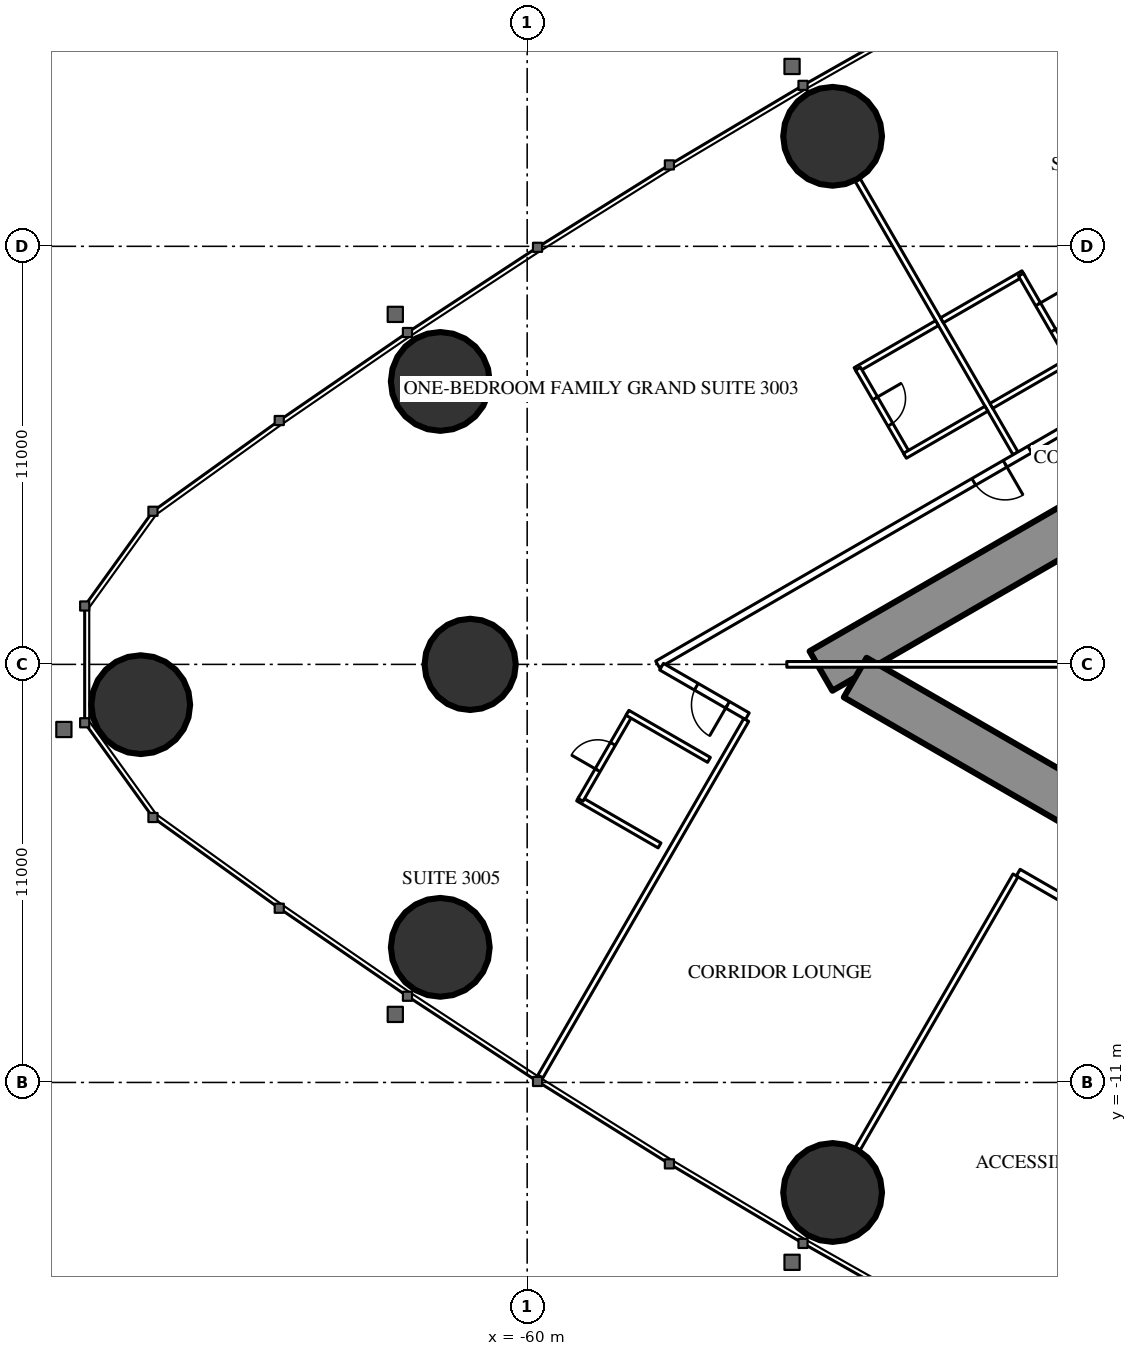
"""IFC4 building model, lengths in metres.
Left out: names, types, materials, properties, quantities, classifications, styles, units other than length and angle.
Written with IfcOpenShell. Run it as: python <this file> out.ifc"""

import sys

from ifc_helpers import new_model, si_unit, direction, frame, frame_2d, origin, origin_2d, place, context, subcontext, project, spatial, rectangle, circle, hollow_circle, extrude, element, fill, save


model = new_model("IFC4")
c1 = context("Model", 3, precision=1e-05, world=origin(), true_north=direction((0.0, 1.0)))
c2 = subcontext(c1, "Body", "Model", "MODEL_VIEW")
j1 = project(units=[si_unit("LENGTHUNIT", "METRE"), si_unit("PLANEANGLEUNIT", "RADIAN")], contexts=[c1])
p1 = place(None, origin())
s1 = spatial("IfcSite", under=j1, at=p1, CompositionType="ELEMENT")
p2 = place(p1, origin())
s2 = spatial("IfcBuilding", under=s1, at=p2, CompositionType="ELEMENT")
p3 = place(p2, frame((0.0, 0.0, 115.1)))
s3 = spatial("IfcBuildingStorey", under=s2, at=p3, CompositionType="ELEMENT", Elevation=115.1)
for number, where, z_axis, x_axis in (
    (1, (-70.168, -1.06, 0.0), (0.0, 0.0, 1.0), (1.0, 0.0, 0.0)),
    (2, (-62.287, -7.445, 0.0), (0.0, 0.0, 1.0), (1.0, 0.0, 0.0)),
    (3, (-51.963, -13.895, 0.0), (0.0, 0.0, 1.0), (1.0, 0.0, 0.0)),
    (4, (-51.963, 13.895, 0.0), (0.0, 0.0, 1.0), (1.0, 0.0, 0.0)),
    (5, (-62.287, 7.445, 0.0), (0.0, 0.0, 1.0), (1.0, 0.0, 0.0)),
):
    element("IfcColumn", number, at=place(p3, frame(where, z_axis=z_axis, x_axis=x_axis)), inside=s3, PredefinedType="COLUMN", context=c2, shape_type="SweptSolid", body=[
        extrude(hollow_circle(Radius=1.3, WallThickness=0.1, at=origin_2d()), origin(), (0.0, 0.0, 1.0), 3.5),
    ])
p4 = place(p3, frame((-61.5, 0.0, 0.0), z_axis=(0.0, 0.0, 1.0), x_axis=(1.0, 0.0, 0.0)))
e6 = element("IfcColumn", 6, at=p4, inside=s3, PredefinedType="COLUMN", context=c2, shape_type="SweptSolid", body=[
    extrude(circle(Radius=1.2, at=origin_2d()), origin(), (0.0, 0.0, 1.0), 3.5),
])
p5 = place(p3, frame((-27.2, 14.3, 0.0), z_axis=(0.0, 0.0, 1.0), x_axis=(-0.866026593062, -0.499997940104, 0.0)))
e7 = element("IfcWall", 7, at=p5, inside=s3, PredefinedType="SHEAR", context=c2, shape_type="SweptSolid", body=[
    extrude(rectangle(XDim=28.946, YDim=1.2, at=frame_2d((14.473, 0.0))), origin(), (0.0, 0.0, 1.0), 3.5),
])
p6 = place(p5, frame((4.6, 0.0, 0.0)))
e8 = element("IfcOpeningElement", 8, at=p6, cuts=e7, PredefinedType="OPENING", context=c2, shape_type="SweptSolid", body=[
    extrude(rectangle(XDim=1.0, YDim=2.2, at=frame_2d((0.5, 1.1))), frame((0.0, 0.61, 0.0), z_axis=(0.0, -1.0, 0.0), x_axis=(1.0, 0.0, 0.0)), (0.0, 0.0, 1.0), 1.22),
])
p7 = place(p5, frame((13.395, 0.0, 0.0)))
e9 = element("IfcOpeningElement", 9, at=p7, cuts=e7, PredefinedType="OPENING", context=c2, shape_type="SweptSolid", body=[
    extrude(rectangle(XDim=1.8, YDim=2.2, at=frame_2d((0.9, 1.1))), frame((0.0, 0.61, 0.0), z_axis=(0.0, -1.0, 0.0), x_axis=(1.0, 0.0, 0.0)), (0.0, 0.0, 1.0), 1.22),
])
p8 = place(p3, frame((-27.2, -14.3, 0.0), z_axis=(0.0, 0.0, 1.0), x_axis=(-0.866024021859, 0.500002393557, 0.0)))
e10 = element("IfcWall", 10, at=p8, inside=s3, PredefinedType="SHEAR", context=c2, shape_type="SweptSolid", body=[
    extrude(rectangle(XDim=27.907, YDim=1.2, at=frame_2d((13.954, 0.0))), origin(), (0.0, 0.0, 1.0), 3.5),
])
p9 = place(p8, frame((4.6, 0.0, 0.0)))
e11 = element("IfcOpeningElement", 11, at=p9, cuts=e10, PredefinedType="OPENING", context=c2, shape_type="SweptSolid", body=[
    extrude(rectangle(XDim=1.0, YDim=2.2, at=frame_2d((0.5, 1.1))), frame((0.0, 0.61, 0.0), z_axis=(0.0, -1.0, 0.0), x_axis=(1.0, 0.0, 0.0)), (0.0, 0.0, 1.0), 1.22),
])
p10 = place(p8, frame((13.395, 0.0, 0.0)))
e12 = element("IfcOpeningElement", 12, at=p10, cuts=e10, PredefinedType="OPENING", context=c2, shape_type="SweptSolid", body=[
    extrude(rectangle(XDim=1.8, YDim=2.2, at=frame_2d((0.9, 1.1))), frame((0.0, 0.61, 0.0), z_axis=(0.0, -1.0, 0.0), x_axis=(1.0, 0.0, 0.0)), (0.0, 0.0, 1.0), 1.22),
])
for number, where, z_axis, x_axis in (
    (13, (-47.151, 5.552, 0.0), (0.0, 0.0, 1.0), (-0.5, 0.866, 0.0)),
    (14, (-47.151, -5.552, 0.0), (0.0, 0.0, 1.0), (-0.5, -0.866, 0.0)),
):
    element("IfcWall", number, at=place(p3, frame(where, z_axis=z_axis, x_axis=x_axis)), inside=s3, PredefinedType="PARTITIONING", context=c2, shape_type="SweptSolid", body=[
        extrude(rectangle(XDim=8.311, YDim=0.15, at=frame_2d((4.156, 0.0))), origin(), (0.0, 0.0, 1.0), 2.2),
    ])
p11 = place(p3, frame((-54.236, -1.462, 0.0), z_axis=(0.0, 0.0, 1.0), x_axis=(-0.499990351854, -0.866030974073, 0.0)))
e15 = element("IfcWall", 15, at=p11, inside=s3, PredefinedType="PARTITIONING", context=c2, shape_type="SweptSolid", body=[
    extrude(rectangle(XDim=10.834, YDim=0.15, at=frame_2d((5.417, 0.0))), origin(), (0.0, 0.0, 1.0), 3.25),
])
p12 = place(p3, frame((-37.7, 10.894, 0.0), z_axis=(0.0, 0.0, 1.0), x_axis=(-0.866027905338, -0.499995667157, 0.0)))
e16 = element("IfcWall", 16, at=p12, inside=s3, PredefinedType="PARTITIONING", context=c2, shape_type="SweptSolid", body=[
    extrude(rectangle(XDim=21.787, YDim=0.2, at=frame_2d((10.894, 0.0))), origin(), (0.0, 0.0, 1.0), 3.25),
])
p13 = place(p12, frame((11.23, 0.0, 0.0)))
e17 = element("IfcOpeningElement", 17, at=p13, cuts=e16, PredefinedType="OPENING", context=c2, shape_type="SweptSolid", body=[
    extrude(rectangle(XDim=0.95, YDim=2.2, at=frame_2d((0.475, 1.1))), frame((0.0, 0.11, 0.0), z_axis=(0.0, -1.0, 0.0), x_axis=(1.0, 0.0, 0.0)), (0.0, 0.0, 1.0), 0.22),
])
p14 = place(p12, frame((9.531, 0.0, 0.0)))
e18 = element("IfcOpeningElement", 18, at=p14, cuts=e16, PredefinedType="OPENING", context=c2, shape_type="SweptSolid", body=[
    extrude(rectangle(XDim=0.95, YDim=2.2, at=frame_2d((0.475, 1.1))), frame((0.0, 0.11, 0.0), z_axis=(0.0, -1.0, 0.0), x_axis=(1.0, 0.0, 0.0)), (0.0, 0.0, 1.0), 0.22),
])
p15 = place(p3, frame((-36.92, -11.344, 0.0), z_axis=(0.0, 0.0, 1.0), x_axis=(-0.866027897759, 0.499995680284, 0.0)))
e19 = element("IfcWall", 19, at=p15, inside=s3, PredefinedType="PARTITIONING", context=c2, shape_type="SweptSolid", body=[
    extrude(rectangle(XDim=11.731, YDim=0.2, at=frame_2d((5.865, 0.0))), origin(), (0.0, 0.0, 1.0), 3.25),
])
p16 = place(p15, frame((3.35, 0.0, 0.0)))
e20 = element("IfcOpeningElement", 20, at=p16, cuts=e19, PredefinedType="OPENING", context=c2, shape_type="SweptSolid", body=[
    extrude(rectangle(XDim=1.0, YDim=2.2, at=frame_2d((0.5, 1.1))), frame((0.0, 0.11, 0.0), z_axis=(0.0, -1.0, 0.0), x_axis=(1.0, 0.0, 0.0)), (0.0, 0.0, 1.0), 0.22),
])
p17 = place(p3, frame((-54.207, -1.363, 0.0), z_axis=(0.0, 0.0, 1.0), x_axis=(-0.866049872286, 0.499957616916, 0.0)))
e21 = element("IfcWall", 21, at=p17, inside=s3, PredefinedType="PARTITIONING", context=c2, shape_type="SweptSolid", body=[
    extrude(rectangle(XDim=2.606, YDim=0.2, at=frame_2d((1.303, 0.0))), origin(), (0.0, 0.0, 1.0), 3.25),
])
p18 = place(p17, frame((0.6, 0.0, 0.0)))
e22 = element("IfcOpeningElement", 22, at=p18, cuts=e21, PredefinedType="OPENING", context=c2, shape_type="SweptSolid", body=[
    extrude(rectangle(XDim=0.95, YDim=2.2, at=frame_2d((0.475, 1.1))), frame((0.0, 0.11, 0.0), z_axis=(0.0, -1.0, 0.0), x_axis=(1.0, 0.0, 0.0)), (0.0, 0.0, 1.0), 0.22),
])
p19 = place(p3, frame((-49.216, 8.979, 0.0), z_axis=(0.0, 0.0, 1.0), x_axis=(-0.866031185235, -0.4999899861, 0.0)))
e23 = element("IfcWall", 23, at=p19, inside=s3, PredefinedType="PARTITIONING", context=c2, shape_type="SweptSolid", body=[
    extrude(rectangle(XDim=2.475, YDim=0.15, at=frame_2d((1.238, 0.0))), origin(), (0.0, 0.0, 1.0), 3.25),
])
p20 = place(p3, frame((-49.995, 5.527, 0.0), z_axis=(0.0, 0.0, 1.0), x_axis=(-0.500006934395, 0.866021400173, 0.0)))
e24 = element("IfcWall", 24, at=p20, inside=s3, PredefinedType="PARTITIONING", context=c2, shape_type="SweptSolid", body=[
    extrude(rectangle(XDim=2.6, YDim=0.15, at=frame_2d((1.3, 0.0))), origin(), (0.0, 0.0, 1.0), 3.25),
])
p21 = place(p20, frame((0.9, 0.0, 0.0)))
e25 = element("IfcOpeningElement", 25, at=p21, cuts=e24, PredefinedType="OPENING", context=c2, shape_type="SweptSolid", body=[
    extrude(rectangle(XDim=0.8, YDim=2.2, at=frame_2d((0.4, 1.1))), frame((0.0, 0.085, 0.0), z_axis=(0.0, -1.0, 0.0), x_axis=(1.0, 0.0, 0.0)), (0.0, 0.0, 1.0), 0.17),
])
for number, where, z_axis, x_axis in (
    (26, (-47.916, 6.727, 0.0), (0.0, 0.0, 1.0), (-0.866, -0.5, 0.0)),
    (27, (-56.517, -4.764, 0.0), (0.0, 0.0, 1.0), (-0.866, 0.5, 0.0)),
):
    element("IfcWall", number, at=place(p3, frame(where, z_axis=z_axis, x_axis=x_axis)), inside=s3, PredefinedType="PARTITIONING", context=c2, shape_type="SweptSolid", body=[
        extrude(rectangle(XDim=2.475, YDim=0.15, at=frame_2d((1.238, 0.0))), origin(), (0.0, 0.0, 1.0), 3.25),
    ])
p22 = place(p3, frame((-57.296, -1.312, 0.0), z_axis=(0.0, 0.0, 1.0), x_axis=(-0.49997716683, -0.86603858612, 0.0)))
e28 = element("IfcWall", 28, at=p22, inside=s3, PredefinedType="PARTITIONING", context=c2, shape_type="SweptSolid", body=[
    extrude(rectangle(XDim=2.6, YDim=0.15, at=frame_2d((1.3, 0.0))), origin(), (0.0, 0.0, 1.0), 3.25),
])
p23 = place(p22, frame((0.9, 0.0, 0.0)))
e29 = element("IfcOpeningElement", 29, at=p23, cuts=e28, PredefinedType="OPENING", context=c2, shape_type="SweptSolid", body=[
    extrude(rectangle(XDim=0.8, YDim=2.2, at=frame_2d((0.4, 1.1))), frame((0.0, 0.085, 0.0), z_axis=(0.0, -1.0, 0.0), x_axis=(1.0, 0.0, 0.0)), (0.0, 0.0, 1.0), 0.17),
])
p24 = place(p3, frame((-55.217, -2.512, 0.0), z_axis=(0.0, 0.0, 1.0), x_axis=(-0.866031185235, 0.4999899861, 0.0)))
e30 = element("IfcWall", 30, at=p24, inside=s3, PredefinedType="PARTITIONING", context=c2, shape_type="SweptSolid", body=[
    extrude(rectangle(XDim=2.475, YDim=0.15, at=frame_2d((1.238, 0.0))), origin(), (0.0, 0.0, 1.0), 3.25),
])
p25 = place(p3, frame((-46.943, 10.292, 0.0), z_axis=(0.0, 0.0, 1.0), x_axis=(-0.866006523861, -0.500032699561, 0.0)))
e31 = element("IfcWall", 31, at=p25, inside=s3, PredefinedType="PARTITIONING", context=c2, shape_type="SweptSolid", body=[
    extrude(rectangle(XDim=2.475, YDim=0.15, at=frame_2d((1.237, 0.0))), origin(), (0.0, 0.0, 1.0), 3.25),
])
p26 = place(p3, frame((-45.708, 8.002, 0.0), z_axis=(0.0, 0.0, 1.0), x_axis=(-0.500047596559, 0.865997922154, 0.0)))
e32 = element("IfcWall", 32, at=p26, inside=s3, PredefinedType="PARTITIONING", context=c2, shape_type="SweptSolid", body=[
    extrude(rectangle(XDim=2.6, YDim=0.15, at=frame_2d((1.3, 0.0))), origin(), (0.0, 0.0, 1.0), 3.25),
])
p27 = place(p26, frame((0.9, 0.0, 0.0)))
e33 = element("IfcOpeningElement", 33, at=p27, cuts=e32, PredefinedType="OPENING", context=c2, shape_type="SweptSolid", body=[
    extrude(rectangle(XDim=0.8, YDim=2.2, at=frame_2d((0.4, 1.1))), frame((0.0, 0.085, 0.0), z_axis=(0.0, -1.0, 0.0), x_axis=(1.0, 0.0, 0.0)), (0.0, 0.0, 1.0), 0.17),
])
p28 = place(p3, frame((-45.643, 8.04, 0.0), z_axis=(0.0, 0.0, 1.0), x_axis=(-0.866006523861, -0.500032699561, 0.0)))
e34 = element("IfcWall", 34, at=p28, inside=s3, PredefinedType="PARTITIONING", context=c2, shape_type="SweptSolid", body=[
    extrude(rectangle(XDim=2.475, YDim=0.15, at=frame_2d((1.237, 0.0))), origin(), (0.0, 0.0, 1.0), 3.25),
])
p29 = place(p3, frame((-44.575, 0.0, 0.0), z_axis=(0.0, 0.0, 1.0), x_axis=(-1.0, 0.0, 0.0)))
e35 = element("IfcWall", 35, at=p29, inside=s3, PredefinedType="PARTITIONING", context=c2, shape_type="SweptSolid", body=[
    extrude(rectangle(XDim=8.593, YDim=0.15, at=frame_2d((4.297, 0.0))), origin(), (0.0, 0.0, 1.0), 2.2),
])
p30 = place(p21, origin())
e36 = element("IfcDoor", 36, at=p30, inside=s3, OperationType="SINGLE_SWING_RIGHT", PredefinedType="DOOR", context=c2, shape_type="SweptSolid", body=[
    extrude(rectangle(XDim=0.8, YDim=2.2, at=frame_2d((0.4, 1.1))), frame((0.0, 0.025, 0.0), z_axis=(0.0, -1.0, 0.0), x_axis=(1.0, 0.0, 0.0)), (0.0, 0.0, 1.0), 0.05),
])
fill(e25, e36)
p31 = place(p13, origin())
e37 = element("IfcDoor", 37, at=p31, inside=s3, OperationType="SINGLE_SWING_LEFT", PredefinedType="DOOR", context=c2, shape_type="SweptSolid", body=[
    extrude(rectangle(XDim=0.95, YDim=2.2, at=frame_2d((0.475, 1.1))), frame((0.0, 0.025, 0.0), z_axis=(0.0, -1.0, 0.0), x_axis=(1.0, 0.0, 0.0)), (0.0, 0.0, 1.0), 0.05),
])
fill(e17, e37)
p32 = place(p23, origin())
e38 = element("IfcDoor", 38, at=p32, inside=s3, OperationType="SINGLE_SWING_RIGHT", PredefinedType="DOOR", context=c2, shape_type="SweptSolid", body=[
    extrude(rectangle(XDim=0.8, YDim=2.2, at=frame_2d((0.4, 1.1))), frame((0.0, 0.025, 0.0), z_axis=(0.0, -1.0, 0.0), x_axis=(1.0, 0.0, 0.0)), (0.0, 0.0, 1.0), 0.05),
])
fill(e29, e38)
p33 = place(p18, origin())
e39 = element("IfcDoor", 39, at=p33, inside=s3, OperationType="SINGLE_SWING_LEFT", PredefinedType="DOOR", context=c2, shape_type="SweptSolid", body=[
    extrude(rectangle(XDim=0.95, YDim=2.2, at=frame_2d((0.475, 1.1))), frame((0.0, 0.025, 0.0), z_axis=(0.0, -1.0, 0.0), x_axis=(1.0, 0.0, 0.0)), (0.0, 0.0, 1.0), 0.05),
])
fill(e22, e39)
p34 = place(p27, origin())
e40 = element("IfcDoor", 40, at=p34, inside=s3, OperationType="SINGLE_SWING_RIGHT", PredefinedType="DOOR", context=c2, shape_type="SweptSolid", body=[
    extrude(rectangle(XDim=0.8, YDim=2.2, at=frame_2d((0.4, 1.1))), frame((0.0, 0.025, 0.0), z_axis=(0.0, -1.0, 0.0), x_axis=(1.0, 0.0, 0.0)), (0.0, 0.0, 1.0), 0.05),
])
fill(e33, e40)
p35 = place(p14, origin())
e41 = element("IfcDoor", 41, at=p35, inside=s3, OperationType="SINGLE_SWING_LEFT", PredefinedType="DOOR", context=c2, shape_type="SweptSolid", body=[
    extrude(rectangle(XDim=0.95, YDim=2.2, at=frame_2d((0.475, 1.1))), frame((0.0, 0.025, 0.0), z_axis=(0.0, -1.0, 0.0), x_axis=(1.0, 0.0, 0.0)), (0.0, 0.0, 1.0), 0.05),
])
fill(e18, e41)
save(model, sys.argv[1])
